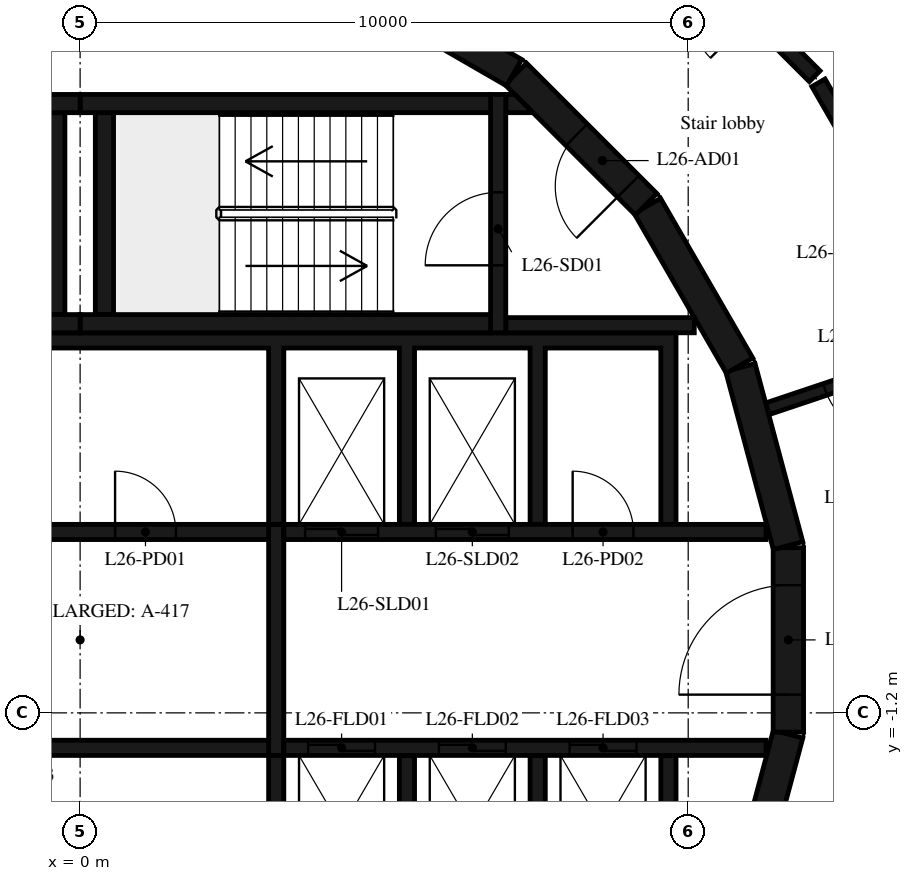
"""IFC4 building model, lengths in metres.
Left out: names, types, materials, properties, quantities, classifications, styles, units other than length and angle.
Written with IfcOpenShell. Run it as: python <this file> out.ifc"""

import sys

from ifc_helpers import new_model, si_unit, direction, frame, frame_2d, origin, place, context, subcontext, project, spatial, polyline, rectangle, outline, extrude, element, fill, save


model = new_model("IFC4")
c1 = context("Model", 3, precision=1e-05, world=origin(), true_north=direction((0.0, 1.0)))
c2 = subcontext(c1, "Body", "Model", "MODEL_VIEW")
j1 = project(units=[si_unit("LENGTHUNIT", "METRE"), si_unit("PLANEANGLEUNIT", "RADIAN")], contexts=[c1])
p1 = place(None, origin())
s1 = spatial("IfcSite", under=j1, at=p1, CompositionType="ELEMENT")
p2 = place(p1, origin())
s2 = spatial("IfcBuilding", under=s1, at=p2, CompositionType="ELEMENT")
p3 = place(p2, frame((0.0, 0.0, 108.2)))
s3 = spatial("IfcBuildingStorey", under=s2, at=p3, CompositionType="ELEMENT", Elevation=108.2)
p4 = place(p3, frame((10.858, -4.479, 0.0), z_axis=(0.0, 0.0, 1.0), x_axis=(0.258734743916, 0.965948410781, 0.0)))
e1 = element("IfcWall", 1, at=p4, inside=s3, PredefinedType="SHEAR", context=c2, shape_type="SweptSolid", body=[
    extrude(rectangle(XDim=3.033, YDim=0.5, at=frame_2d((1.516, 0.0))), origin(), (0.0, 0.0, 1.0), 4.75),
])
p5 = place(p3, frame((11.647, -1.516, 0.0), z_axis=(0.0, 0.0, 1.0), x_axis=(0.0, 1.0, 0.0)))
e2 = element("IfcWall", 2, at=p5, inside=s3, PredefinedType="SHEAR", context=c2, shape_type="SweptSolid", body=[
    extrude(rectangle(XDim=3.033, YDim=0.5, at=frame_2d((1.516, 0.0))), origin(), (0.0, 0.0, 1.0), 4.75),
])
p6 = place(p5, frame((0.616, 0.0, 0.0)))
e3 = element("IfcOpeningElement", 3, at=p6, cuts=e2, PredefinedType="OPENING", context=c2, shape_type="SweptSolid", body=[
    extrude(rectangle(XDim=1.8, YDim=2.1, at=frame_2d((0.9, 1.05))), frame((0.0, 0.26, 0.0), z_axis=(0.0, -1.0, 0.0), x_axis=(1.0, 0.0, 0.0)), (0.0, 0.0, 1.0), 0.52),
])
for number, where, z_axis, x_axis in (
    (4, (11.643, 1.55, 0.0), (0.0, 0.0, 1.0), (-0.259, 0.966, 0.0)),
    (5, (10.845, 4.51, 0.0), (0.0, 0.0, 1.0), (-0.5, 0.866, 0.0)),
):
    element("IfcWall", number, at=place(p3, frame(where, z_axis=z_axis, x_axis=x_axis)), inside=s3, PredefinedType="SHEAR", context=c2, shape_type="SweptSolid", body=[
        extrude(rectangle(XDim=3.033, YDim=0.5, at=frame_2d((1.516, 0.0))), origin(), (0.0, 0.0, 1.0), 4.75),
    ])
p7 = place(p3, frame((9.308, 7.164, 0.0), z_axis=(0.0, 0.0, 1.0), x_axis=(-0.707106781187, 0.707106781187, 0.0)))
e6 = element("IfcWall", 6, at=p7, inside=s3, PredefinedType="SHEAR", context=c2, shape_type="SweptSolid", body=[
    extrude(rectangle(XDim=3.032, YDim=0.5, at=frame_2d((1.516, 0.0))), origin(), (0.0, 0.0, 1.0), 4.75),
])
p8 = place(p7, frame((0.416, 0.0, 0.0)))
e7 = element("IfcOpeningElement", 7, at=p8, cuts=e6, PredefinedType="OPENING", context=c2, shape_type="SweptSolid", body=[
    extrude(rectangle(XDim=1.2, YDim=2.1, at=frame_2d((0.6, 1.05))), frame((0.0, 0.26, 0.0), z_axis=(0.0, -1.0, 0.0), x_axis=(1.0, 0.0, 0.0)), (0.0, 0.0, 1.0), 0.52),
])
p9 = place(p3, frame((7.137, 9.329, 0.0), z_axis=(0.0, 0.0, 1.0), x_axis=(-0.865975092491, 0.500087131594, 0.0)))
e8 = element("IfcWall", 8, at=p9, inside=s3, PredefinedType="SHEAR", context=c2, shape_type="SweptSolid", body=[
    extrude(rectangle(XDim=3.033, YDim=0.5, at=frame_2d((1.516, 0.0))), origin(), (0.0, 0.0, 1.0), 4.75),
])
for number, where, z_axis, x_axis in (
    (9, (0.0, 5.2, 0.0), (0.0, 0.0, 1.0), (1.0, 0.0, 0.0)),
    (10, (0.0, 8.82, 0.0), (0.0, 0.0, 1.0), (1.0, 0.0, 0.0)),
):
    element("IfcWall", number, at=place(p3, frame(where, z_axis=z_axis, x_axis=x_axis)), inside=s3, PredefinedType="SHEAR", context=c2, shape_type="SweptSolid", body=[
        extrude(rectangle(XDim=6.75, YDim=0.3, at=frame_2d((3.375, 0.0))), origin(), (0.0, 0.0, 1.0), 4.75),
    ])
p10 = place(p3, frame((0.4, 5.35, 0.0), z_axis=(0.0, 0.0, 1.0), x_axis=(0.0, 1.0, 0.0)))
e11 = element("IfcWall", 11, at=p10, inside=s3, PredefinedType="SHEAR", context=c2, shape_type="SweptSolid", body=[
    extrude(rectangle(XDim=3.32, YDim=0.3, at=frame_2d((1.66, 0.0))), origin(), (0.0, 0.0, 1.0), 4.75),
])
p11 = place(p3, frame((6.875, 5.05, 0.0), z_axis=(0.0, 0.0, 1.0), x_axis=(0.0, 1.0, 0.0)))
e12 = element("IfcWall", 12, at=p11, inside=s3, PredefinedType="SHEAR", context=c2, shape_type="SweptSolid", body=[
    extrude(rectangle(XDim=3.92, YDim=0.25, at=frame_2d((1.96, 0.0))), origin(), (0.0, 0.0, 1.0), 4.75),
])
p12 = place(p11, frame((1.11, 0.0, 0.0)))
e13 = element("IfcOpeningElement", 13, at=p12, cuts=e12, PredefinedType="OPENING", context=c2, shape_type="SweptSolid", body=[
    extrude(rectangle(XDim=1.2, YDim=2.1, at=frame_2d((0.6, 1.05))), frame((0.0, 0.135, 0.0), z_axis=(0.0, -1.0, 0.0), x_axis=(1.0, 0.0, 0.0)), (0.0, 0.0, 1.0), 0.27),
])
p13 = place(p3, frame((7.0, 5.175, 0.0), z_axis=(0.0, 0.0, 1.0), x_axis=(1.0, 0.0, 0.0)))
e14 = element("IfcWall", 14, at=p13, inside=s3, PredefinedType="SHEAR", context=c2, shape_type="SweptSolid", body=[
    extrude(rectangle(XDim=3.1, YDim=0.25, at=frame_2d((1.55, 0.0))), origin(), (0.0, 0.0, 1.0), 4.75),
])
p14 = place(p3, origin())
e15 = element("IfcWall", 15, at=p14, inside=s3, PredefinedType="SHEAR", context=c2, shape_type="SweptSolid", body=[
    extrude(outline(polyline([(7.448, 8.67), (7.0, 8.67), (7.0, 8.97), (7.148, 8.97), (7.448, 8.67)])), origin(), (0.0, 0.0, 1.0), 4.75),
])
for number, where, z_axis, x_axis in (
    (16, (-6.75, 5.2, 0.0), (0.0, 0.0, 1.0), (1.0, 0.0, 0.0)),
    (17, (-6.75, 8.82, 0.0), (0.0, 0.0, 1.0), (1.0, 0.0, 0.0)),
):
    element("IfcWall", number, at=place(p3, frame(where, z_axis=z_axis, x_axis=x_axis)), inside=s3, PredefinedType="SHEAR", context=c2, shape_type="SweptSolid", body=[
        extrude(rectangle(XDim=6.75, YDim=0.3, at=frame_2d((3.375, 0.0))), origin(), (0.0, 0.0, 1.0), 4.75),
    ])
p15 = place(p3, frame((-0.4, 5.35, 0.0), z_axis=(0.0, 0.0, 1.0), x_axis=(0.0, 1.0, 0.0)))
e18 = element("IfcWall", 18, at=p15, inside=s3, PredefinedType="SHEAR", context=c2, shape_type="SweptSolid", body=[
    extrude(rectangle(XDim=3.32, YDim=0.3, at=frame_2d((1.66, 0.0))), origin(), (0.0, 0.0, 1.0), 4.75),
])
p16 = place(p3, origin())
e19 = element("IfcWall", 19, at=p16, inside=s3, PredefinedType="SHEAR", context=c2, shape_type="SweptSolid", body=[
    extrude(outline(polyline([(-9.55, 4.8), (-7.65, 4.8), (-7.65, 1.9), (-7.4, 1.9), (-7.4, 4.8), (-5.5, 4.8), (-5.5, 1.9), (-5.25, 1.9), (-5.25, 4.8), (-3.35, 4.8), (-3.35, 1.9), (-3.1, 1.9), (-3.1, 4.8), (-1.2, 4.8), (-1.2, 1.9), (-0.95, 1.9), (-0.95, 4.8), (3.1, 4.8), (3.1, 1.9), (3.35, 1.9), (3.35, 4.8), (5.25, 4.8), (5.25, 1.9), (5.5, 1.9), (5.5, 4.8), (7.4, 4.8), (7.4, 1.9), (7.65, 1.9), (7.65, 4.8), (9.55, 4.8), (9.55, 1.9), (9.8, 1.9), (9.8, 4.8), (9.8, 5.05), (-9.8, 5.05), (-9.8, 4.8), (-9.8, 1.9), (-9.55, 1.9), (-9.55, 4.8)])), origin(), (0.0, 0.0, 1.0), 4.75),
])
p17 = place(p3, origin())
e20 = element("IfcWall", 20, at=p17, inside=s3, PredefinedType="SHEAR", context=c2, shape_type="SweptSolid", body=[
    extrude(outline(polyline([(9.8, -5.05), (9.8, -4.8), (9.8, -1.9), (9.55, -1.9), (9.55, -4.8), (7.65, -4.8), (7.65, -1.9), (7.4, -1.9), (7.4, -4.8), (5.5, -4.8), (5.5, -1.9), (5.25, -1.9), (5.25, -4.8), (3.35, -4.8), (3.35, -1.9), (3.1, -1.9), (3.1, -4.8), (-5.25, -4.8), (-5.25, -1.9), (-5.5, -1.9), (-5.5, -4.8), (-7.4, -4.8), (-7.4, -1.9), (-7.65, -1.9), (-7.65, -4.8), (-9.55, -4.8), (-9.55, -1.9), (-9.8, -1.9), (-9.8, -4.8), (-9.8, -5.05), (9.8, -5.05)])), origin(), (0.0, 0.0, 1.0), 4.75),
])
p18 = place(p3, frame((-11.28, 1.775, 0.0), z_axis=(0.0, 0.0, 1.0), x_axis=(1.0, 0.0, 0.0)))
e21 = element("IfcWall", 21, at=p18, inside=s3, PredefinedType="SHEAR", context=c2, shape_type="SweptSolid", body=[
    extrude(rectangle(XDim=14.38, YDim=0.25, at=frame_2d((7.19, 0.0))), origin(), (0.0, 0.0, 1.0), 4.75),
])
p19 = place(p18, frame((2.13, 0.0, 0.0)))
e22 = element("IfcOpeningElement", 22, at=p19, cuts=e21, PredefinedType="OPENING", context=c2, shape_type="SweptSolid", body=[
    extrude(rectangle(XDim=1.1, YDim=2.1, at=frame_2d((0.55, 1.05))), frame((0.0, 0.135, 0.0), z_axis=(0.0, -1.0, 0.0), x_axis=(1.0, 0.0, 0.0)), (0.0, 0.0, 1.0), 0.27),
])
p20 = place(p18, frame((4.28, 0.0, 0.0)))
e23 = element("IfcOpeningElement", 23, at=p20, cuts=e21, PredefinedType="OPENING", context=c2, shape_type="SweptSolid", body=[
    extrude(rectangle(XDim=1.1, YDim=2.1, at=frame_2d((0.55, 1.05))), frame((0.0, 0.135, 0.0), z_axis=(0.0, -1.0, 0.0), x_axis=(1.0, 0.0, 0.0)), (0.0, 0.0, 1.0), 0.27),
])
p21 = place(p18, frame((6.43, 0.0, 0.0)))
e24 = element("IfcOpeningElement", 24, at=p21, cuts=e21, PredefinedType="OPENING", context=c2, shape_type="SweptSolid", body=[
    extrude(rectangle(XDim=1.1, YDim=2.1, at=frame_2d((0.55, 1.05))), frame((0.0, 0.135, 0.0), z_axis=(0.0, -1.0, 0.0), x_axis=(1.0, 0.0, 0.0)), (0.0, 0.0, 1.0), 0.27),
])
p22 = place(p18, frame((8.58, 0.0, 0.0)))
e25 = element("IfcOpeningElement", 25, at=p22, cuts=e21, PredefinedType="OPENING", context=c2, shape_type="SweptSolid", body=[
    extrude(rectangle(XDim=1.1, YDim=2.1, at=frame_2d((0.55, 1.05))), frame((0.0, 0.135, 0.0), z_axis=(0.0, -1.0, 0.0), x_axis=(1.0, 0.0, 0.0)), (0.0, 0.0, 1.0), 0.27),
])
p23 = place(p18, frame((11.855, 0.0, 0.0)))
e26 = element("IfcOpeningElement", 26, at=p23, cuts=e21, PredefinedType="OPENING", context=c2, shape_type="SweptSolid", body=[
    extrude(rectangle(XDim=1.0, YDim=2.4, at=frame_2d((0.5, 1.2))), frame((0.0, 0.135, 0.0), z_axis=(0.0, -1.0, 0.0), x_axis=(1.0, 0.0, 0.0)), (0.0, 0.0, 1.0), 0.27),
])
p24 = place(p3, frame((3.35, 1.775, 0.0), z_axis=(0.0, 0.0, 1.0), x_axis=(1.0, 0.0, 0.0)))
e27 = element("IfcWall", 27, at=p24, inside=s3, PredefinedType="SHEAR", context=c2, shape_type="SweptSolid", body=[
    extrude(rectangle(XDim=7.93, YDim=0.25, at=frame_2d((3.965, 0.0))), origin(), (0.0, 0.0, 1.0), 4.75),
])
p25 = place(p24, frame((0.35, 0.0, 0.0)))
e28 = element("IfcOpeningElement", 28, at=p25, cuts=e27, PredefinedType="OPENING", context=c2, shape_type="SweptSolid", body=[
    extrude(rectangle(XDim=1.2, YDim=2.4, at=frame_2d((0.6, 1.2))), frame((0.0, 0.135, 0.0), z_axis=(0.0, -1.0, 0.0), x_axis=(1.0, 0.0, 0.0)), (0.0, 0.0, 1.0), 0.27),
])
p26 = place(p24, frame((2.5, 0.0, 0.0)))
e29 = element("IfcOpeningElement", 29, at=p26, cuts=e27, PredefinedType="OPENING", context=c2, shape_type="SweptSolid", body=[
    extrude(rectangle(XDim=1.2, YDim=2.4, at=frame_2d((0.6, 1.2))), frame((0.0, 0.135, 0.0), z_axis=(0.0, -1.0, 0.0), x_axis=(1.0, 0.0, 0.0)), (0.0, 0.0, 1.0), 0.27),
])
p27 = place(p24, frame((4.75, 0.0, 0.0)))
e30 = element("IfcOpeningElement", 30, at=p27, cuts=e27, PredefinedType="OPENING", context=c2, shape_type="SweptSolid", body=[
    extrude(rectangle(XDim=1.0, YDim=2.4, at=frame_2d((0.5, 1.2))), frame((0.0, 0.135, 0.0), z_axis=(0.0, -1.0, 0.0), x_axis=(1.0, 0.0, 0.0)), (0.0, 0.0, 1.0), 0.27),
])
p28 = place(p3, frame((-11.28, -1.775, 0.0), z_axis=(0.0, 0.0, 1.0), x_axis=(1.0, 0.0, 0.0)))
e31 = element("IfcWall", 31, at=p28, inside=s3, PredefinedType="SHEAR", context=c2, shape_type="SweptSolid", body=[
    extrude(rectangle(XDim=14.38, YDim=0.25, at=frame_2d((7.19, 0.0))), origin(), (0.0, 0.0, 1.0), 4.75),
])
p29 = place(p28, frame((9.705, 0.0, 0.0)))
e32 = element("IfcOpeningElement", 32, at=p29, cuts=e31, PredefinedType="OPENING", context=c2, shape_type="SweptSolid", body=[
    extrude(rectangle(XDim=1.0, YDim=2.4, at=frame_2d((0.5, 1.2))), frame((0.0, 0.135, 0.0), z_axis=(0.0, -1.0, 0.0), x_axis=(1.0, 0.0, 0.0)), (0.0, 0.0, 1.0), 0.27),
])
p30 = place(p3, frame((3.35, -1.775, 0.0), z_axis=(0.0, 0.0, 1.0), x_axis=(1.0, 0.0, 0.0)))
e33 = element("IfcWall", 33, at=p30, inside=s3, PredefinedType="SHEAR", context=c2, shape_type="SweptSolid", body=[
    extrude(rectangle(XDim=7.93, YDim=0.25, at=frame_2d((3.965, 0.0))), origin(), (0.0, 0.0, 1.0), 4.75),
])
p31 = place(p30, frame((0.4, 0.0, 0.0)))
e34 = element("IfcOpeningElement", 34, at=p31, cuts=e33, PredefinedType="OPENING", context=c2, shape_type="SweptSolid", body=[
    extrude(rectangle(XDim=1.1, YDim=2.4, at=frame_2d((0.55, 1.2))), frame((0.0, 0.135, 0.0), z_axis=(0.0, -1.0, 0.0), x_axis=(1.0, 0.0, 0.0)), (0.0, 0.0, 1.0), 0.27),
])
p32 = place(p30, frame((2.55, 0.0, 0.0)))
e35 = element("IfcOpeningElement", 35, at=p32, cuts=e33, PredefinedType="OPENING", context=c2, shape_type="SweptSolid", body=[
    extrude(rectangle(XDim=1.1, YDim=2.4, at=frame_2d((0.55, 1.2))), frame((0.0, 0.135, 0.0), z_axis=(0.0, -1.0, 0.0), x_axis=(1.0, 0.0, 0.0)), (0.0, 0.0, 1.0), 0.27),
])
p33 = place(p30, frame((4.7, 0.0, 0.0)))
e36 = element("IfcOpeningElement", 36, at=p33, cuts=e33, PredefinedType="OPENING", context=c2, shape_type="SweptSolid", body=[
    extrude(rectangle(XDim=1.1, YDim=2.4, at=frame_2d((0.55, 1.2))), frame((0.0, 0.135, 0.0), z_axis=(0.0, -1.0, 0.0), x_axis=(1.0, 0.0, 0.0)), (0.0, 0.0, 1.0), 0.27),
])
p34 = place(p3, frame((3.225, -1.9, 0.0), z_axis=(0.0, 0.0, 1.0), x_axis=(0.0, 1.0, 0.0)))
e37 = element("IfcWall", 37, at=p34, inside=s3, PredefinedType="SHEAR", context=c2, shape_type="SweptSolid", body=[
    extrude(rectangle(XDim=3.8, YDim=0.25, at=frame_2d((1.9, 0.0))), origin(), (0.0, 0.0, 1.0), 4.75),
])
p35 = place(p3, frame((12.08, 9.27, 0.0), z_axis=(0.0, 0.0, 1.0), x_axis=(-0.707106781187, 0.707106781187, 0.0)))
e38 = element("IfcWall", 38, at=p35, inside=s3, PredefinedType="PARTITIONING", context=c2, shape_type="SweptSolid", body=[
    extrude(rectangle(XDim=3.849, YDim=0.25, at=frame_2d((1.925, 0.0))), origin(), (0.0, 0.0, 1.0), 4.75),
])
p36 = place(p35, frame((1.425, 0.0, 0.0)))
e39 = element("IfcOpeningElement", 39, at=p36, cuts=e38, PredefinedType="OPENING", context=c2, shape_type="SweptSolid", body=[
    extrude(rectangle(XDim=1.0, YDim=2.1, at=frame_2d((0.5, 1.05))), frame((0.0, 0.135, 0.0), z_axis=(0.0, -1.0, 0.0), x_axis=(1.0, 0.0, 0.0)), (0.0, 0.0, 1.0), 0.27),
])
p37 = place(p3, frame((13.39, 7.0, 0.0), z_axis=(0.0, 0.0, 1.0), x_axis=(-0.499790202325, 0.86614649665, 0.0)))
e40 = element("IfcWall", 40, at=p37, inside=s3, PredefinedType="PARTITIONING", context=c2, shape_type="SweptSolid", body=[
    extrude(rectangle(XDim=2.496, YDim=0.25, at=frame_2d((1.248, 0.0))), origin(), (0.0, 0.0, 1.0), 4.75),
])
p38 = place(p3, frame((14.34, 4.82, 0.0), z_axis=(0.0, 0.0, 1.0), x_axis=(-0.94805712629, -0.318100118345, 0.0)))
e41 = element("IfcWall", 41, at=p38, inside=s3, PredefinedType="PARTITIONING", context=c2, shape_type="SweptSolid", body=[
    extrude(rectangle(XDim=3.207, YDim=0.2, at=frame_2d((1.603, 0.0))), origin(), (0.0, 0.0, 1.0), 4.75),
])
p39 = place(p38, frame((1.003, 0.0, 0.0)))
e42 = element("IfcOpeningElement", 42, at=p39, cuts=e41, PredefinedType="OPENING", context=c2, shape_type="SweptSolid", body=[
    extrude(rectangle(XDim=1.2, YDim=2.1, at=frame_2d((0.6, 1.05))), frame((0.0, 0.11, 0.0), z_axis=(0.0, -1.0, 0.0), x_axis=(1.0, 0.0, 0.0)), (0.0, 0.0, 1.0), 0.22),
])
p40 = place(p12, origin())
e43 = element("IfcDoor", 43, at=p40, inside=s3, OperationType="SINGLE_SWING_LEFT", PredefinedType="DOOR", context=c2, shape_type="SweptSolid", body=[
    extrude(rectangle(XDim=1.2, YDim=2.1, at=frame_2d((0.6, 1.05))), frame((0.0, 0.025, 0.0), z_axis=(0.0, -1.0, 0.0), x_axis=(1.0, 0.0, 0.0)), (0.0, 0.0, 1.0), 0.05),
])
fill(e13, e43)
p41 = place(p8, origin())
e44 = element("IfcDoor", 44, at=p41, inside=s3, OperationType="SINGLE_SWING_RIGHT", PredefinedType="DOOR", context=c2, shape_type="SweptSolid", body=[
    extrude(rectangle(XDim=1.2, YDim=2.1, at=frame_2d((0.6, 1.05))), frame((0.0, 0.025, 0.0), z_axis=(0.0, -1.0, 0.0), x_axis=(1.0, 0.0, 0.0)), (0.0, 0.0, 1.0), 0.05),
])
fill(e7, e44)
p42 = place(p6, origin())
e45 = element("IfcDoor", 45, at=p42, inside=s3, OperationType="DOUBLE_DOOR_SINGLE_SWING", PredefinedType="DOOR", context=c2, shape_type="SweptSolid", body=[
    extrude(rectangle(XDim=1.8, YDim=2.1, at=frame_2d((0.9, 1.05))), frame((0.0, 0.025, 0.0), z_axis=(0.0, -1.0, 0.0), x_axis=(1.0, 0.0, 0.0)), (0.0, 0.0, 1.0), 0.05),
])
fill(e3, e45)
p43 = place(p25, origin())
e46 = element("IfcDoor", 46, at=p43, inside=s3, OperationType="DOUBLE_DOOR_SLIDING", PredefinedType="DOOR", context=c2, shape_type="SweptSolid", body=[
    extrude(rectangle(XDim=1.2, YDim=2.4, at=frame_2d((0.6, 1.2))), frame((0.0, 0.025, 0.0), z_axis=(0.0, -1.0, 0.0), x_axis=(1.0, 0.0, 0.0)), (0.0, 0.0, 1.0), 0.05),
])
fill(e28, e46)
p44 = place(p26, origin())
e47 = element("IfcDoor", 47, at=p44, inside=s3, OperationType="DOUBLE_DOOR_SLIDING", PredefinedType="DOOR", context=c2, shape_type="SweptSolid", body=[
    extrude(rectangle(XDim=1.2, YDim=2.4, at=frame_2d((0.6, 1.2))), frame((0.0, 0.025, 0.0), z_axis=(0.0, -1.0, 0.0), x_axis=(1.0, 0.0, 0.0)), (0.0, 0.0, 1.0), 0.05),
])
fill(e29, e47)
p45 = place(p31, origin())
e48 = element("IfcDoor", 48, at=p45, inside=s3, OperationType="DOUBLE_DOOR_SLIDING", PredefinedType="DOOR", context=c2, shape_type="SweptSolid", body=[
    extrude(rectangle(XDim=1.1, YDim=2.4, at=frame_2d((0.55, 1.2))), frame((0.0, 0.025, 0.0), z_axis=(0.0, -1.0, 0.0), x_axis=(1.0, 0.0, 0.0)), (0.0, 0.0, 1.0), 0.05),
])
fill(e34, e48)
p46 = place(p32, origin())
e49 = element("IfcDoor", 49, at=p46, inside=s3, OperationType="DOUBLE_DOOR_SLIDING", PredefinedType="DOOR", context=c2, shape_type="SweptSolid", body=[
    extrude(rectangle(XDim=1.1, YDim=2.4, at=frame_2d((0.55, 1.2))), frame((0.0, 0.025, 0.0), z_axis=(0.0, -1.0, 0.0), x_axis=(1.0, 0.0, 0.0)), (0.0, 0.0, 1.0), 0.05),
])
fill(e35, e49)
p47 = place(p33, origin())
e50 = element("IfcDoor", 50, at=p47, inside=s3, OperationType="DOUBLE_DOOR_SLIDING", PredefinedType="DOOR", context=c2, shape_type="SweptSolid", body=[
    extrude(rectangle(XDim=1.1, YDim=2.4, at=frame_2d((0.55, 1.2))), frame((0.0, 0.025, 0.0), z_axis=(0.0, -1.0, 0.0), x_axis=(1.0, 0.0, 0.0)), (0.0, 0.0, 1.0), 0.05),
])
fill(e36, e50)
p48 = place(p23, origin())
e51 = element("IfcDoor", 51, at=p48, inside=s3, OperationType="SINGLE_SWING_RIGHT", PredefinedType="DOOR", context=c2, shape_type="SweptSolid", body=[
    extrude(rectangle(XDim=1.0, YDim=2.4, at=frame_2d((0.5, 1.2))), frame((0.0, 0.025, 0.0), z_axis=(0.0, -1.0, 0.0), x_axis=(1.0, 0.0, 0.0)), (0.0, 0.0, 1.0), 0.05),
])
fill(e26, e51)
p49 = place(p27, origin())
e52 = element("IfcDoor", 52, at=p49, inside=s3, OperationType="SINGLE_SWING_LEFT", PredefinedType="DOOR", context=c2, shape_type="SweptSolid", body=[
    extrude(rectangle(XDim=1.0, YDim=2.4, at=frame_2d((0.5, 1.2))), frame((0.0, 0.025, 0.0), z_axis=(0.0, -1.0, 0.0), x_axis=(1.0, 0.0, 0.0)), (0.0, 0.0, 1.0), 0.05),
])
fill(e30, e52)
p50 = place(p39, origin())
e53 = element("IfcDoor", 53, at=p50, inside=s3, OperationType="SINGLE_SWING_LEFT", PredefinedType="DOOR", context=c2, shape_type="SweptSolid", body=[
    extrude(rectangle(XDim=1.2, YDim=2.1, at=frame_2d((0.6, 1.05))), frame((0.0, 0.025, 0.0), z_axis=(0.0, -1.0, 0.0), x_axis=(1.0, 0.0, 0.0)), (0.0, 0.0, 1.0), 0.05),
])
fill(e42, e53)
save(model, sys.argv[1])
